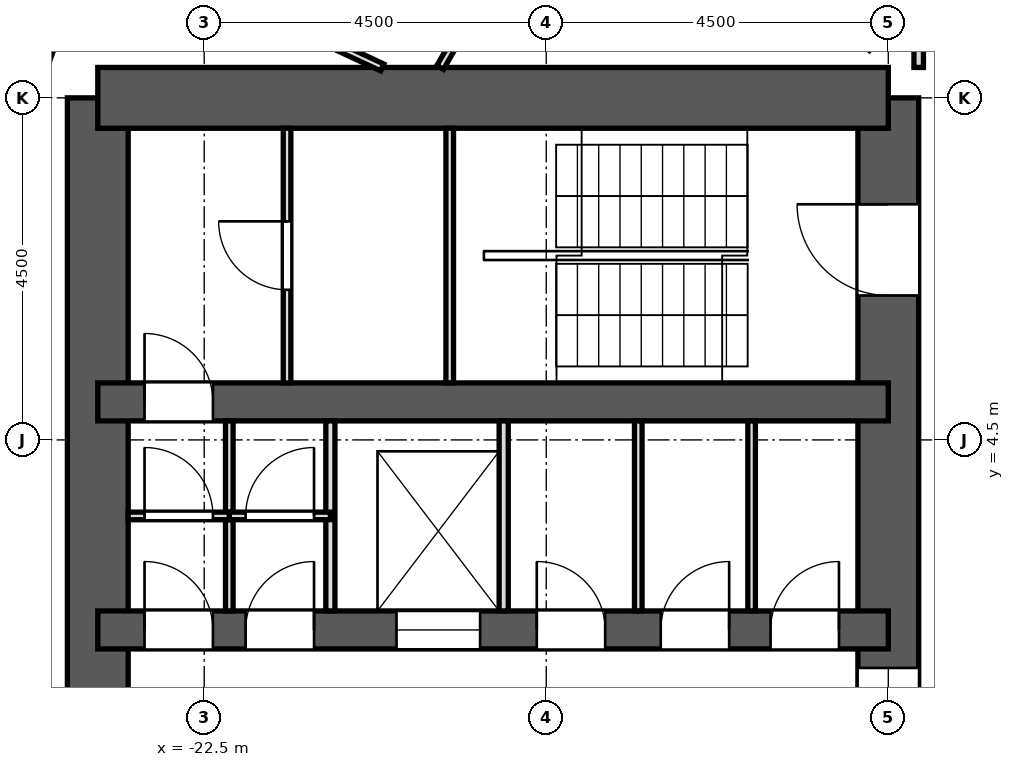
"""IFC4 building model, lengths in metres.
Left out: names, types, materials, properties, quantities, classifications, styles, units other than length and angle.
Written with IfcOpenShell. Run it as: python <this file> out.ifc"""

import sys

from ifc_helpers import new_model, si_unit, direction, frame, frame_2d, origin, place, context, subcontext, project, spatial, rectangle, extrude, element, fill, save


model = new_model("IFC4")
c1 = context("Model", 3, precision=1e-05, world=origin(), true_north=direction((0.0, 1.0)))
c2 = subcontext(c1, "Body", "Model", "MODEL_VIEW")
j1 = project(units=[si_unit("LENGTHUNIT", "METRE"), si_unit("PLANEANGLEUNIT", "RADIAN")], contexts=[c1])
p1 = place(None, origin())
s1 = spatial("IfcSite", under=j1, at=p1, CompositionType="ELEMENT")
p2 = place(p1, origin())
s2 = spatial("IfcBuilding", under=s1, at=p2, CompositionType="ELEMENT")
p3 = place(p2, frame((0.0, 0.0, 141.4)))
s3 = spatial("IfcBuildingStorey", under=s2, at=p3, CompositionType="ELEMENT", Elevation=141.4)
p4 = place(p3, frame((-13.5, -9.0, 0.0), z_axis=(0.0, 0.0, 1.0), x_axis=(0.0, 1.0, 0.0)))
e1 = element("IfcWall", 1, at=p4, inside=s3, PredefinedType="SHEAR", context=c2, shape_type="SweptSolid", body=[
    extrude(rectangle(XDim=18.0, YDim=0.8, at=frame_2d((9.0, 0.0))), origin(), (0.0, 0.0, 1.0), 3.3),
])
p5 = place(p4, frame((15.4, 0.0, 0.0)))
e2 = element("IfcOpeningElement", 2, at=p5, cuts=e1, PredefinedType="OPENING", context=c2, shape_type="SweptSolid", body=[
    extrude(rectangle(XDim=1.2, YDim=2.1, at=frame_2d((0.6, 1.05))), frame((0.0, 0.412, 0.0), z_axis=(0.0, -1.0, 0.0), x_axis=(1.0, 0.0, 0.0)), (0.0, 0.0, 1.0), 0.824),
])
p6 = place(p4, frame((1.4, 0.0, 0.0)))
e3 = element("IfcOpeningElement", 3, at=p6, cuts=e1, PredefinedType="OPENING", context=c2, shape_type="SweptSolid", body=[
    extrude(rectangle(XDim=1.2, YDim=2.1, at=frame_2d((0.6, 1.05))), frame((0.0, 0.412, 0.0), z_axis=(0.0, -1.0, 0.0), x_axis=(1.0, 0.0, 0.0)), (0.0, 0.0, 1.0), 0.824),
])
p7 = place(p4, frame((7.5, 0.0, 0.0)))
e4 = element("IfcOpeningElement", 4, at=p7, cuts=e1, PredefinedType="OPENING", context=c2, shape_type="SweptSolid", body=[
    extrude(rectangle(XDim=3.0, YDim=2.4, at=frame_2d((1.5, 1.2))), frame((0.0, 0.412, 0.0), z_axis=(0.0, -1.0, 0.0), x_axis=(1.0, 0.0, 0.0)), (0.0, 0.0, 1.0), 0.824),
])
p8 = place(p3, frame((-23.9, -9.0, 0.0), z_axis=(0.0, 0.0, 1.0), x_axis=(0.0, 1.0, 0.0)))
e5 = element("IfcWall", 5, at=p8, inside=s3, PredefinedType="SHEAR", context=c2, shape_type="SweptSolid", body=[
    extrude(rectangle(XDim=18.0, YDim=0.8, at=frame_2d((9.0, 0.0))), origin(), (0.0, 0.0, 1.0), 3.3),
])
p9 = place(p3, frame((-13.5, 9.0, 0.0), z_axis=(0.0, 0.0, 1.0), x_axis=(-1.0, 0.0, 0.0)))
e6 = element("IfcWall", 6, at=p9, inside=s3, PredefinedType="SHEAR", context=c2, shape_type="SweptSolid", body=[
    extrude(rectangle(XDim=10.4, YDim=0.8, at=frame_2d((5.2, 0.0))), origin(), (0.0, 0.0, 1.0), 3.3),
])
p10 = place(p3, frame((-13.5, 5.0, 0.0), z_axis=(0.0, 0.0, 1.0), x_axis=(-1.0, 0.0, 0.0)))
e7 = element("IfcWall", 7, at=p10, inside=s3, PredefinedType="SHEAR", context=c2, shape_type="SweptSolid", body=[
    extrude(rectangle(XDim=10.4, YDim=0.5, at=frame_2d((5.2, 0.0))), origin(), (0.0, 0.0, 1.0), 3.3),
])
p11 = place(p10, frame((8.885, 0.0, 0.0)))
e8 = element("IfcOpeningElement", 8, at=p11, cuts=e7, PredefinedType="OPENING", context=c2, shape_type="SweptSolid", body=[
    extrude(rectangle(XDim=0.9, YDim=2.1, at=frame_2d((0.45, 1.05))), frame((0.0, 0.262, 0.0), z_axis=(0.0, -1.0, 0.0), x_axis=(1.0, 0.0, 0.0)), (0.0, 0.0, 1.0), 0.524),
])
p12 = place(p3, frame((-13.5, 2.0, 0.0), z_axis=(0.0, 0.0, 1.0), x_axis=(-1.0, 0.0, 0.0)))
e9 = element("IfcWall", 9, at=p12, inside=s3, PredefinedType="SHEAR", context=c2, shape_type="SweptSolid", body=[
    extrude(rectangle(XDim=10.4, YDim=0.5, at=frame_2d((5.2, 0.0))), origin(), (0.0, 0.0, 1.0), 3.3),
])
p13 = place(p12, frame((5.37, 0.0, 0.0)))
e10 = element("IfcOpeningElement", 10, at=p13, cuts=e9, PredefinedType="OPENING", context=c2, shape_type="SweptSolid", body=[
    extrude(rectangle(XDim=1.1, YDim=2.1, at=frame_2d((0.55, 1.05))), frame((0.0, 0.262, 0.0), z_axis=(0.0, -1.0, 0.0), x_axis=(1.0, 0.0, 0.0)), (0.0, 0.0, 1.0), 0.524),
])
p14 = place(p12, frame((0.649, 0.0, 0.0)))
e11 = element("IfcOpeningElement", 11, at=p14, cuts=e9, PredefinedType="OPENING", context=c2, shape_type="SweptSolid", body=[
    extrude(rectangle(XDim=0.9, YDim=2.1, at=frame_2d((0.45, 1.05))), frame((0.0, 0.262, 0.0), z_axis=(0.0, -1.0, 0.0), x_axis=(1.0, 0.0, 0.0)), (0.0, 0.0, 1.0), 0.524),
])
p15 = place(p12, frame((2.094, 0.0, 0.0)))
e12 = element("IfcOpeningElement", 12, at=p15, cuts=e9, PredefinedType="OPENING", context=c2, shape_type="SweptSolid", body=[
    extrude(rectangle(XDim=0.9, YDim=2.1, at=frame_2d((0.45, 1.05))), frame((0.0, 0.262, 0.0), z_axis=(0.0, -1.0, 0.0), x_axis=(1.0, 0.0, 0.0)), (0.0, 0.0, 1.0), 0.524),
])
p16 = place(p12, frame((3.725, 0.0, 0.0)))
e13 = element("IfcOpeningElement", 13, at=p16, cuts=e9, PredefinedType="OPENING", context=c2, shape_type="SweptSolid", body=[
    extrude(rectangle(XDim=0.9, YDim=2.1, at=frame_2d((0.45, 1.05))), frame((0.0, 0.262, 0.0), z_axis=(0.0, -1.0, 0.0), x_axis=(1.0, 0.0, 0.0)), (0.0, 0.0, 1.0), 0.524),
])
p17 = place(p12, frame((7.555, 0.0, 0.0)))
e14 = element("IfcOpeningElement", 14, at=p17, cuts=e9, PredefinedType="OPENING", context=c2, shape_type="SweptSolid", body=[
    extrude(rectangle(XDim=0.9, YDim=2.1, at=frame_2d((0.45, 1.05))), frame((0.0, 0.262, 0.0), z_axis=(0.0, -1.0, 0.0), x_axis=(1.0, 0.0, 0.0)), (0.0, 0.0, 1.0), 0.524),
])
p18 = place(p12, frame((8.885, 0.0, 0.0)))
e15 = element("IfcOpeningElement", 15, at=p18, cuts=e9, PredefinedType="OPENING", context=c2, shape_type="SweptSolid", body=[
    extrude(rectangle(XDim=0.9, YDim=2.1, at=frame_2d((0.45, 1.05))), frame((0.0, 0.262, 0.0), z_axis=(0.0, -1.0, 0.0), x_axis=(1.0, 0.0, 0.0)), (0.0, 0.0, 1.0), 0.524),
])
p19 = place(p3, frame((-24.369, 10.811, 0.0), z_axis=(0.0, 0.0, 1.0), x_axis=(-0.341990236633, -0.939703505393, 0.0)))
e16 = element("IfcWall", 16, at=p19, inside=s3, PredefinedType="SOLIDWALL", context=c2, shape_type="SweptSolid", body=[
    extrude(rectangle(XDim=3.648, YDim=0.6, at=frame_2d((1.824, 0.0))), origin(), (0.0, 0.0, 1.0), 2.8),
])
p20 = place(p3, frame((-13.097, 13.097, 0.0), z_axis=(0.0, 0.0, 1.0), x_axis=(0.707106781187, -0.707106781187, 0.0)))
e17 = element("IfcWall", 17, at=p20, inside=s3, PredefinedType="PARTITIONING", context=c2, shape_type="SweptSolid", body=[
    extrude(rectangle(XDim=6.815, YDim=0.125, at=frame_2d((3.407, 0.0))), origin(), (0.0, 0.0, 1.0), 2.8),
])
p21 = place(p3, frame((-23.26, 10.847, 0.0), z_axis=(0.0, 0.0, 1.0), x_axis=(0.906223222272, -0.422799564114, 0.0)))
e18 = element("IfcWall", 18, at=p21, inside=s3, PredefinedType="PARTITIONING", context=c2, shape_type="SweptSolid", body=[
    extrude(rectangle(XDim=3.423, YDim=0.1, at=frame_2d((1.711, 0.0))), origin(), (0.0, 0.0, 1.0), 2.8),
])
p22 = place(p3, frame((-19.396, 9.4, 0.0), z_axis=(0.0, 0.0, 1.0), x_axis=(0.500210961829, 0.865903570651, 0.0)))
e19 = element("IfcWall", 19, at=p22, inside=s3, PredefinedType="PARTITIONING", context=c2, shape_type="SweptSolid", body=[
    extrude(rectangle(XDim=1.831, YDim=0.1, at=frame_2d((0.916, 0.0))), origin(), (0.0, 0.0, 1.0), 2.8),
])
p23 = place(p3, frame((-13.1, 9.4, 0.0), z_axis=(0.0, 0.0, 1.0), x_axis=(0.0, 1.0, 0.0)))
e20 = element("IfcWall", 20, at=p23, inside=s3, PredefinedType="PARTITIONING", context=c2, shape_type="SweptSolid", body=[
    extrude(rectangle(XDim=3.634, YDim=0.125, at=frame_2d((1.817, 0.0))), origin(), (0.0, 0.0, 1.0), 2.8),
])
p24 = place(p23, frame((1.285, 0.0, 0.0)))
e21 = element("IfcOpeningElement", 21, at=p24, cuts=e20, PredefinedType="OPENING", context=c2, shape_type="SweptSolid", body=[
    extrude(rectangle(XDim=1.0, YDim=2.1, at=frame_2d((0.5, 1.05))), frame((0.0, 0.074, 0.0), z_axis=(0.0, -1.0, 0.0), x_axis=(1.0, 0.0, 0.0)), (0.0, 0.0, 1.0), 0.149),
])
for number, where, z_axis, x_axis in (
    (22, (-15.298, 2.25, 0.0), (0.0, 0.0, 1.0), (0.0, 1.0, 0.0)),
    (23, (-16.789, 2.25, 0.0), (0.0, 0.0, 1.0), (0.0, 1.0, 0.0)),
):
    element("IfcWall", number, at=place(p3, frame(where, z_axis=z_axis, x_axis=x_axis)), inside=s3, PredefinedType="PARTITIONING", context=c2, shape_type="SweptSolid", body=[
        extrude(rectangle(XDim=2.5, YDim=0.1, at=frame_2d((1.25, 0.0))), origin(), (0.0, 0.0, 1.0), 2.8),
    ])
for number, where, z_axis, x_axis in (
    (24, (-18.56, 2.25, 0.0), (0.0, 0.0, 1.0), (0.0, 1.0, 0.0)),
    (25, (-20.84, 2.25, 0.0), (0.0, 0.0, 1.0), (0.0, 1.0, 0.0)),
):
    element("IfcWall", number, at=place(p3, frame(where, z_axis=z_axis, x_axis=x_axis)), inside=s3, PredefinedType="PARTITIONING", context=c2, shape_type="SweptSolid", body=[
        extrude(rectangle(XDim=2.5, YDim=0.12, at=frame_2d((1.25, 0.0))), origin(), (0.0, 0.0, 1.0), 2.8),
    ])
p25 = place(p3, frame((-22.17, 2.25, 0.0), z_axis=(0.0, 0.0, 1.0), x_axis=(0.0, 1.0, 0.0)))
e26 = element("IfcWall", 26, at=p25, inside=s3, PredefinedType="PARTITIONING", context=c2, shape_type="SweptSolid", body=[
    extrude(rectangle(XDim=2.5, YDim=0.1, at=frame_2d((1.25, 0.0))), origin(), (0.0, 0.0, 1.0), 2.8),
])
p26 = place(p3, frame((-20.84, 3.5, 0.0), z_axis=(0.0, 0.0, 1.0), x_axis=(-1.0, 0.0, 0.0)))
e27 = element("IfcWall", 27, at=p26, inside=s3, PredefinedType="PARTITIONING", context=c2, shape_type="SweptSolid", body=[
    extrude(rectangle(XDim=1.33, YDim=0.1, at=frame_2d((0.665, 0.0))), origin(), (0.0, 0.0, 1.0), 2.8),
])
p27 = place(p26, frame((0.215, 0.0, 0.0)))
e28 = element("IfcOpeningElement", 28, at=p27, cuts=e27, PredefinedType="OPENING", context=c2, shape_type="SweptSolid", body=[
    extrude(rectangle(XDim=0.9, YDim=2.1, at=frame_2d((0.45, 1.05))), frame((0.0, 0.062, 0.0), z_axis=(0.0, -1.0, 0.0), x_axis=(1.0, 0.0, 0.0)), (0.0, 0.0, 1.0), 0.124),
])
p28 = place(p3, frame((-22.17, 3.5, 0.0), z_axis=(0.0, 0.0, 1.0), x_axis=(-1.0, 0.0, 0.0)))
e29 = element("IfcWall", 29, at=p28, inside=s3, PredefinedType="PARTITIONING", context=c2, shape_type="SweptSolid", body=[
    extrude(rectangle(XDim=1.33, YDim=0.1, at=frame_2d((0.665, 0.0))), origin(), (0.0, 0.0, 1.0), 2.8),
])
p29 = place(p28, frame((0.215, 0.0, 0.0)))
e30 = element("IfcOpeningElement", 30, at=p29, cuts=e29, PredefinedType="OPENING", context=c2, shape_type="SweptSolid", body=[
    extrude(rectangle(XDim=0.9, YDim=2.1, at=frame_2d((0.45, 1.05))), frame((0.0, 0.062, 0.0), z_axis=(0.0, -1.0, 0.0), x_axis=(1.0, 0.0, 0.0)), (0.0, 0.0, 1.0), 0.124),
])
p30 = place(p3, frame((-19.27, 5.25, 0.0), z_axis=(0.0, 0.0, 1.0), x_axis=(0.0, 1.0, 0.0)))
e31 = element("IfcWall", 31, at=p30, inside=s3, PredefinedType="PARTITIONING", context=c2, shape_type="SweptSolid", body=[
    extrude(rectangle(XDim=3.35, YDim=0.1, at=frame_2d((1.675, 0.0))), origin(), (0.0, 0.0, 1.0), 2.8),
])
p31 = place(p3, frame((-21.41, 5.25, 0.0), z_axis=(0.0, 0.0, 1.0), x_axis=(0.0, 1.0, 0.0)))
e32 = element("IfcWall", 32, at=p31, inside=s3, PredefinedType="PARTITIONING", context=c2, shape_type="SweptSolid", body=[
    extrude(rectangle(XDim=3.35, YDim=0.1, at=frame_2d((1.675, 0.0))), origin(), (0.0, 0.0, 1.0), 2.8),
])
p32 = place(p31, frame((1.225, 0.0, 0.0)))
e33 = element("IfcOpeningElement", 33, at=p32, cuts=e32, PredefinedType="OPENING", context=c2, shape_type="SweptSolid", body=[
    extrude(rectangle(XDim=0.9, YDim=2.1, at=frame_2d((0.45, 1.05))), frame((0.0, 0.062, 0.0), z_axis=(0.0, -1.0, 0.0), x_axis=(1.0, 0.0, 0.0)), (0.0, 0.0, 1.0), 0.124),
])
p33 = place(p13, origin())
e34 = element("IfcDoor", 34, at=p33, inside=s3, OperationType="DOUBLE_DOOR_SLIDING", PredefinedType="DOOR", context=c2, shape_type="SweptSolid", body=[
    extrude(rectangle(XDim=1.1, YDim=2.1, at=frame_2d((0.55, 1.05))), frame((0.0, 0.025, 0.0), z_axis=(0.0, -1.0, 0.0), x_axis=(1.0, 0.0, 0.0)), (0.0, 0.0, 1.0), 0.05),
])
fill(e10, e34)
p34 = place(p14, frame((0.9, 0.0, 0.0), z_axis=(0.0, 0.0, 1.0), x_axis=(-1.0, 0.0, 0.0)))
e35 = element("IfcDoor", 35, at=p34, inside=s3, OperationType="SINGLE_SWING_RIGHT", PredefinedType="DOOR", context=c2, shape_type="SweptSolid", body=[
    extrude(rectangle(XDim=0.9, YDim=2.1, at=frame_2d((0.45, 1.05))), frame((0.0, 0.025, 0.0), z_axis=(0.0, -1.0, 0.0), x_axis=(1.0, 0.0, 0.0)), (0.0, 0.0, 1.0), 0.05),
])
fill(e11, e35)
p35 = place(p15, frame((0.9, 0.0, 0.0), z_axis=(0.0, 0.0, 1.0), x_axis=(-1.0, 0.0, 0.0)))
e36 = element("IfcDoor", 36, at=p35, inside=s3, OperationType="SINGLE_SWING_RIGHT", PredefinedType="DOOR", context=c2, shape_type="SweptSolid", body=[
    extrude(rectangle(XDim=0.9, YDim=2.1, at=frame_2d((0.45, 1.05))), frame((0.0, 0.025, 0.0), z_axis=(0.0, -1.0, 0.0), x_axis=(1.0, 0.0, 0.0)), (0.0, 0.0, 1.0), 0.05),
])
fill(e12, e36)
p36 = place(p16, frame((0.9, 0.0, 0.0), z_axis=(0.0, 0.0, 1.0), x_axis=(-1.0, 0.0, 0.0)))
e37 = element("IfcDoor", 37, at=p36, inside=s3, OperationType="SINGLE_SWING_LEFT", PredefinedType="DOOR", context=c2, shape_type="SweptSolid", body=[
    extrude(rectangle(XDim=0.9, YDim=2.1, at=frame_2d((0.45, 1.05))), frame((0.0, 0.025, 0.0), z_axis=(0.0, -1.0, 0.0), x_axis=(1.0, 0.0, 0.0)), (0.0, 0.0, 1.0), 0.05),
])
fill(e13, e37)
p37 = place(p17, frame((0.9, 0.0, 0.0), z_axis=(0.0, 0.0, 1.0), x_axis=(-1.0, 0.0, 0.0)))
e38 = element("IfcDoor", 38, at=p37, inside=s3, OperationType="SINGLE_SWING_RIGHT", PredefinedType="DOOR", context=c2, shape_type="SweptSolid", body=[
    extrude(rectangle(XDim=0.9, YDim=2.1, at=frame_2d((0.45, 1.05))), frame((0.0, 0.025, 0.0), z_axis=(0.0, -1.0, 0.0), x_axis=(1.0, 0.0, 0.0)), (0.0, 0.0, 1.0), 0.05),
])
fill(e14, e38)
p38 = place(p18, frame((0.9, 0.0, 0.0), z_axis=(0.0, 0.0, 1.0), x_axis=(-1.0, 0.0, 0.0)))
e39 = element("IfcDoor", 39, at=p38, inside=s3, OperationType="SINGLE_SWING_LEFT", PredefinedType="DOOR", context=c2, shape_type="SweptSolid", body=[
    extrude(rectangle(XDim=0.9, YDim=2.1, at=frame_2d((0.45, 1.05))), frame((0.0, 0.025, 0.0), z_axis=(0.0, -1.0, 0.0), x_axis=(1.0, 0.0, 0.0)), (0.0, 0.0, 1.0), 0.05),
])
fill(e15, e39)
p39 = place(p29, frame((0.9, 0.0, 0.0), z_axis=(0.0, 0.0, 1.0), x_axis=(-1.0, 0.0, 0.0)))
e40 = element("IfcDoor", 40, at=p39, inside=s3, OperationType="SINGLE_SWING_LEFT", PredefinedType="DOOR", context=c2, shape_type="SweptSolid", body=[
    extrude(rectangle(XDim=0.9, YDim=2.1, at=frame_2d((0.45, 1.05))), frame((0.0, 0.025, 0.0), z_axis=(0.0, -1.0, 0.0), x_axis=(1.0, 0.0, 0.0)), (0.0, 0.0, 1.0), 0.05),
])
fill(e30, e40)
p40 = place(p27, frame((0.9, 0.0, 0.0), z_axis=(0.0, 0.0, 1.0), x_axis=(-1.0, 0.0, 0.0)))
e41 = element("IfcDoor", 41, at=p40, inside=s3, OperationType="SINGLE_SWING_RIGHT", PredefinedType="DOOR", context=c2, shape_type="SweptSolid", body=[
    extrude(rectangle(XDim=0.9, YDim=2.1, at=frame_2d((0.45, 1.05))), frame((0.0, 0.025, 0.0), z_axis=(0.0, -1.0, 0.0), x_axis=(1.0, 0.0, 0.0)), (0.0, 0.0, 1.0), 0.05),
])
fill(e28, e41)
p41 = place(p32, origin())
e42 = element("IfcDoor", 42, at=p41, inside=s3, OperationType="SINGLE_SWING_RIGHT", PredefinedType="DOOR", context=c2, shape_type="SweptSolid", body=[
    extrude(rectangle(XDim=0.9, YDim=2.1, at=frame_2d((0.45, 1.05))), frame((0.0, 0.025, 0.0), z_axis=(0.0, -1.0, 0.0), x_axis=(1.0, 0.0, 0.0)), (0.0, 0.0, 1.0), 0.05),
])
fill(e33, e42)
p42 = place(p11, frame((0.9, 0.0, 0.0), z_axis=(0.0, 0.0, 1.0), x_axis=(-1.0, 0.0, 0.0)))
e43 = element("IfcDoor", 43, at=p42, inside=s3, OperationType="SINGLE_SWING_LEFT", PredefinedType="DOOR", context=c2, shape_type="SweptSolid", body=[
    extrude(rectangle(XDim=0.9, YDim=2.1, at=frame_2d((0.45, 1.05))), frame((0.0, 0.025, 0.0), z_axis=(0.0, -1.0, 0.0), x_axis=(1.0, 0.0, 0.0)), (0.0, 0.0, 1.0), 0.05),
])
fill(e8, e43)
p43 = place(p5, origin())
e44 = element("IfcDoor", 44, at=p43, inside=s3, OperationType="SINGLE_SWING_RIGHT", PredefinedType="DOOR", context=c2, shape_type="SweptSolid", body=[
    extrude(rectangle(XDim=1.2, YDim=2.1, at=frame_2d((0.6, 1.05))), frame((0.0, 0.025, 0.0), z_axis=(0.0, -1.0, 0.0), x_axis=(1.0, 0.0, 0.0)), (0.0, 0.0, 1.0), 0.05),
])
fill(e2, e44)
p44 = place(p7, origin())
e45 = element("IfcDoor", 45, at=p44, inside=s3, OperationType="DOUBLE_DOOR_SLIDING", PredefinedType="DOOR", context=c2, shape_type="SweptSolid", body=[
    extrude(rectangle(XDim=3.0, YDim=2.4, at=frame_2d((1.5, 1.2))), frame((0.0, 0.025, 0.0), z_axis=(0.0, -1.0, 0.0), x_axis=(1.0, 0.0, 0.0)), (0.0, 0.0, 1.0), 0.05),
])
fill(e4, e45)
save(model, sys.argv[1])
